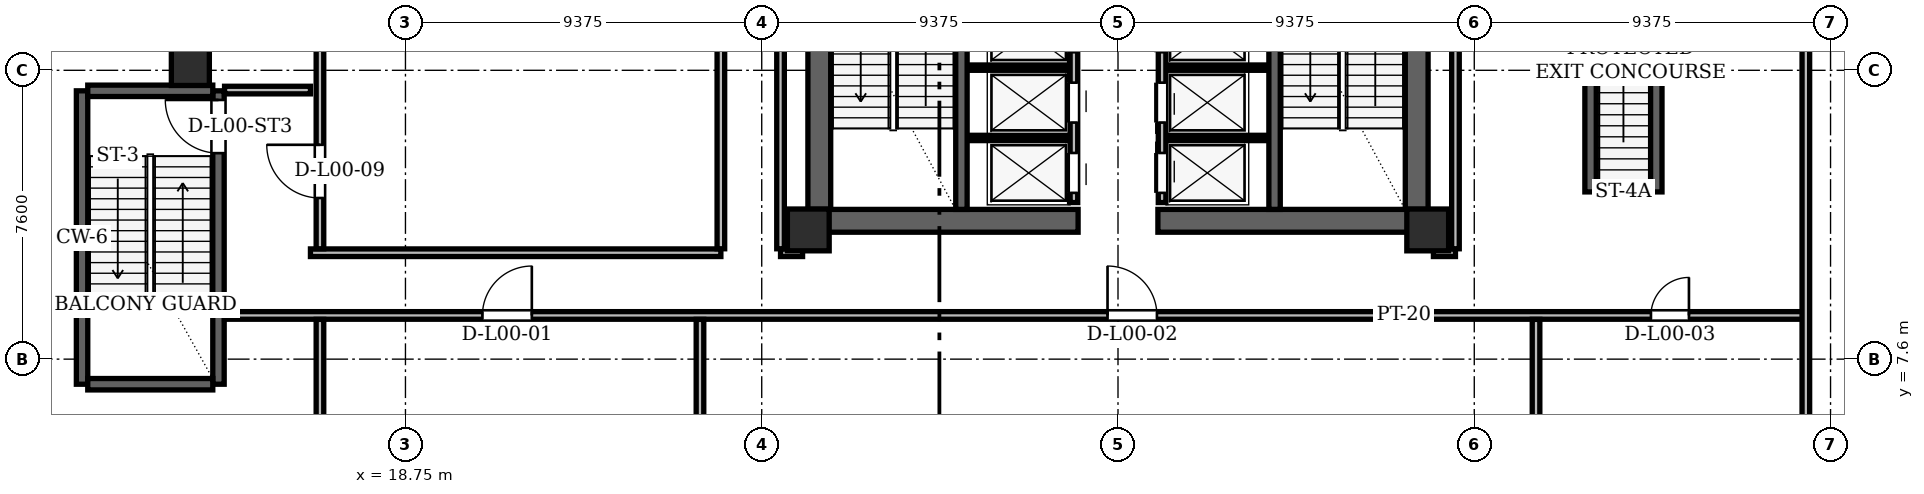
"""IFC4 building model, lengths in metres.
Left out: names, types, materials, properties, quantities, classifications, styles, units other than length and angle.
Written with IfcOpenShell. Run it as: python <this file> out.ifc"""

import sys

from ifc_helpers import new_model, si_unit, direction, frame, frame_2d, origin, origin_2d, place, context, subcontext, project, spatial, rectangle, hollow_rectangle, extrude, element, fill, save


model = new_model("IFC4")
c1 = context("Model", 3, precision=1e-05, world=origin(), true_north=direction((0.0, 1.0)))
c2 = subcontext(c1, "Body", "Model", "MODEL_VIEW")
j1 = project(units=[si_unit("LENGTHUNIT", "METRE"), si_unit("PLANEANGLEUNIT", "RADIAN")], contexts=[c1])
p1 = place(None, origin())
s1 = spatial("IfcSite", under=j1, at=p1, CompositionType="ELEMENT")
p2 = place(p1, origin())
s2 = spatial("IfcBuilding", under=s1, at=p2, CompositionType="ELEMENT")
p3 = place(p2, origin())
s3 = spatial("IfcBuildingStorey", under=s2, at=p3, CompositionType="ELEMENT", Elevation=0.0)
for number, where, z_axis, x_axis in (
    (1, (29.35, 11.0, 0.0), (0.0, 0.0, 1.0), (1.0, 0.0, 0.0)),
    (2, (45.65, 11.0, 0.0), (0.0, 0.0, 1.0), (1.0, 0.0, 0.0)),
):
    element("IfcColumn", number, at=place(p3, frame(where, z_axis=z_axis, x_axis=x_axis)), inside=s3, PredefinedType="COLUMN", context=c2, shape_type="SweptSolid", body=[
        extrude(hollow_rectangle(XDim=1.1, YDim=1.1, WallThickness=0.09, at=origin_2d()), origin(), (0.0, 0.0, 1.0), 5.4),
    ])
p4 = place(p3, frame((13.09, 15.3, 0.004), z_axis=(0.0, 0.0, 1.0), x_axis=(1.0, 0.0, 0.0)))
e3 = element("IfcColumn", 3, at=p4, inside=s3, PredefinedType="COLUMN", context=c2, shape_type="SweptSolid", body=[
    extrude(hollow_rectangle(XDim=1.0, YDim=1.0, WallThickness=0.085, at=origin_2d()), origin(), (0.0, 0.0, 1.0), 5.391),
])
for number, where, z_axis, x_axis in (
    (4, (29.64, 11.0, 0.0), (0.0, 0.0, 1.0), (0.0, 1.0, 0.0)),
    (5, (45.36, 11.0, 0.0), (0.0, 0.0, 1.0), (0.0, 1.0, 0.0)),
):
    element("IfcWall", number, at=place(p3, frame(where, z_axis=z_axis, x_axis=x_axis)), inside=s3, PredefinedType="SHEAR", context=c2, shape_type="SweptSolid", body=[
        extrude(rectangle(XDim=13.3, YDim=0.6, at=frame_2d((6.65, 0.0))), origin(), (0.0, 0.0, 1.0), 5.12),
    ])
for number, where, z_axis, x_axis in (
    (6, (29.35, 11.24, 0.0), (0.0, 0.0, 1.0), (1.0, 0.0, 0.0)),
    (7, (38.55, 11.24, 0.0), (0.0, 0.0, 1.0), (1.0, 0.0, 0.0)),
):
    element("IfcWall", number, at=place(p3, frame(where, z_axis=z_axis, x_axis=x_axis)), inside=s3, PredefinedType="SHEAR", context=c2, shape_type="SweptSolid", body=[
        extrude(rectangle(XDim=7.1, YDim=0.6, at=frame_2d((3.55, 0.0))), origin(), (0.0, 0.0, 1.0), 5.12),
    ])
for number, where, z_axis, x_axis in (
    (8, (33.38, 11.54, 0.0), (0.0, 0.0, 1.0), (0.0, 1.0, 0.0)),
    (9, (41.62, 11.54, 0.0), (0.0, 0.0, 1.0), (0.0, 1.0, 0.0)),
):
    element("IfcWall", number, at=place(p3, frame(where, z_axis=z_axis, x_axis=x_axis)), inside=s3, PredefinedType="SHEAR", context=c2, shape_type="SweptSolid", body=[
        extrude(rectangle(XDim=7.62, YDim=0.3, at=frame_2d((3.81, 0.0))), origin(), (0.0, 0.0, 1.0), 5.12),
    ])
p5 = place(p3, frame((10.24, 6.94, 0.0), z_axis=(0.0, 0.0, 1.0), x_axis=(0.0, 1.0, 0.0)))
e10 = element("IfcWall", 10, at=p5, inside=s3, PredefinedType="SHEAR", context=c2, shape_type="SweptSolid", body=[
    extrude(rectangle(XDim=7.72, YDim=0.3, at=frame_2d((3.86, 0.0))), origin(), (0.0, 0.0, 1.0), 5.12),
])
p6 = place(p3, frame((13.83, 6.94, 0.0), z_axis=(0.0, 0.0, 1.0), x_axis=(0.0, 1.0, 0.0)))
e11 = element("IfcWall", 11, at=p6, inside=s3, PredefinedType="SHEAR", context=c2, shape_type="SweptSolid", body=[
    extrude(rectangle(XDim=7.72, YDim=0.3, at=frame_2d((3.86, 0.0))), origin(), (0.0, 0.0, 1.0), 5.12),
])
p7 = place(p6, frame((6.08, 0.0, 0.0)))
e12 = element("IfcOpeningElement", 12, at=p7, cuts=e11, PredefinedType="OPENING", context=c2, shape_type="SweptSolid", body=[
    extrude(rectangle(XDim=1.4, YDim=2.2, at=frame_2d((0.7, 1.1))), frame((0.0, 0.15, 0.0), z_axis=(0.0, -1.0, 0.0), x_axis=(1.0, 0.0, 0.0)), (0.0, 0.0, 1.0), 0.3),
])
for number, where, z_axis, x_axis in (
    (13, (10.39, 6.94, 0.0), (0.0, 0.0, 1.0), (1.0, 0.0, 0.0)),
    (14, (10.39, 14.66, 0.0), (0.0, 0.0, 1.0), (1.0, 0.0, 0.0)),
):
    element("IfcWall", number, at=place(p3, frame(where, z_axis=z_axis, x_axis=x_axis)), inside=s3, PredefinedType="SHEAR", context=c2, shape_type="SweptSolid", body=[
        extrude(rectangle(XDim=3.29, YDim=0.3, at=frame_2d((1.645, 0.0))), origin(), (0.0, 0.0, 1.0), 5.12),
    ])
for number, where, z_axis, x_axis in (
    (15, (49.935, 12.0, 0.0), (0.0, 0.0, 1.0), (0.0, 1.0, 0.0)),
    (16, (51.665, 12.0, 0.0), (0.0, 0.0, 1.0), (0.0, 1.0, 0.0)),
):
    element("IfcWall", number, at=place(p3, frame(where, z_axis=z_axis, x_axis=x_axis)), inside=s3, PredefinedType="SHEAR", context=c2, shape_type="SweptSolid", body=[
        extrude(rectangle(XDim=8.7, YDim=0.3, at=frame_2d((4.35, 0.0))), origin(), (0.0, 0.0, 1.0), 5.12),
    ])
p8 = place(p3, frame((36.34, 11.72, 0.0), z_axis=(0.0, 0.0, 1.0), x_axis=(0.0, 1.0, 0.0)))
e17 = element("IfcWall", 17, at=p8, inside=s3, PredefinedType="PARTITIONING", context=c2, shape_type="SweptSolid", body=[
    extrude(rectangle(XDim=7.6, YDim=0.2, at=frame_2d((3.8, 0.0))), origin(), (0.0, 0.0, 1.0), 5.12),
])
p9 = place(p8, frame((0.255, 0.0, 0.0)))
e18 = element("IfcOpeningElement", 18, at=p9, cuts=e17, PredefinedType="OPENING", context=c2, shape_type="SweptSolid", body=[
    extrude(rectangle(XDim=1.05, YDim=2.15, at=frame_2d((0.525, 1.075))), frame((0.0, 0.1, 0.0), z_axis=(0.0, -1.0, 0.0), x_axis=(1.0, 0.0, 0.0)), (0.0, 0.0, 1.0), 0.2),
])
p10 = place(p8, frame((2.105, 0.0, 0.0)))
e19 = element("IfcOpeningElement", 19, at=p10, cuts=e17, PredefinedType="OPENING", context=c2, shape_type="SweptSolid", body=[
    extrude(rectangle(XDim=1.05, YDim=2.15, at=frame_2d((0.525, 1.075))), frame((0.0, 0.1, 0.0), z_axis=(0.0, -1.0, 0.0), x_axis=(1.0, 0.0, 0.0)), (0.0, 0.0, 1.0), 0.2),
])
p11 = place(p8, frame((3.955, 0.0, 0.0)))
e20 = element("IfcOpeningElement", 20, at=p11, cuts=e17, PredefinedType="OPENING", context=c2, shape_type="SweptSolid", body=[
    extrude(rectangle(XDim=1.05, YDim=2.15, at=frame_2d((0.525, 1.075))), frame((0.0, 0.1, 0.0), z_axis=(0.0, -1.0, 0.0), x_axis=(1.0, 0.0, 0.0)), (0.0, 0.0, 1.0), 0.2),
])
p12 = place(p8, frame((6.005, 0.0, 0.0)))
e21 = element("IfcOpeningElement", 21, at=p12, cuts=e17, PredefinedType="OPENING", context=c2, shape_type="SweptSolid", body=[
    extrude(rectangle(XDim=1.05, YDim=2.15, at=frame_2d((0.525, 1.075))), frame((0.0, 0.1, 0.0), z_axis=(0.0, -1.0, 0.0), x_axis=(1.0, 0.0, 0.0)), (0.0, 0.0, 1.0), 0.2),
])
for number, where, z_axis, x_axis in (
    (22, (33.56, 13.42, 0.0), (0.0, 0.0, 1.0), (1.0, 0.0, 0.0)),
    (23, (33.56, 15.27, 0.0), (0.0, 0.0, 1.0), (1.0, 0.0, 0.0)),
):
    element("IfcWall", number, at=place(p3, frame(where, z_axis=z_axis, x_axis=x_axis)), inside=s3, PredefinedType="PARTITIONING", context=c2, shape_type="SweptSolid", body=[
        extrude(rectangle(XDim=2.66, YDim=0.14, at=frame_2d((1.33, 0.0))), origin(), (0.0, 0.0, 1.0), 5.12),
    ])
p13 = place(p3, frame((38.66, 11.72, 0.0), z_axis=(0.0, 0.0, 1.0), x_axis=(0.0, 1.0, 0.0)))
e24 = element("IfcWall", 24, at=p13, inside=s3, PredefinedType="PARTITIONING", context=c2, shape_type="SweptSolid", body=[
    extrude(rectangle(XDim=9.1, YDim=0.2, at=frame_2d((4.55, 0.0))), origin(), (0.0, 0.0, 1.0), 5.12),
])
p14 = place(p13, frame((0.255, 0.0, 0.0)))
e25 = element("IfcOpeningElement", 25, at=p14, cuts=e24, PredefinedType="OPENING", context=c2, shape_type="SweptSolid", body=[
    extrude(rectangle(XDim=1.05, YDim=2.15, at=frame_2d((0.525, 1.075))), frame((0.0, 0.1, 0.0), z_axis=(0.0, -1.0, 0.0), x_axis=(1.0, 0.0, 0.0)), (0.0, 0.0, 1.0), 0.2),
])
p15 = place(p13, frame((2.105, 0.0, 0.0)))
e26 = element("IfcOpeningElement", 26, at=p15, cuts=e24, PredefinedType="OPENING", context=c2, shape_type="SweptSolid", body=[
    extrude(rectangle(XDim=1.05, YDim=2.15, at=frame_2d((0.525, 1.075))), frame((0.0, 0.1, 0.0), z_axis=(0.0, -1.0, 0.0), x_axis=(1.0, 0.0, 0.0)), (0.0, 0.0, 1.0), 0.2),
])
p16 = place(p13, frame((3.955, 0.0, 0.0)))
e27 = element("IfcOpeningElement", 27, at=p16, cuts=e24, PredefinedType="OPENING", context=c2, shape_type="SweptSolid", body=[
    extrude(rectangle(XDim=1.05, YDim=2.15, at=frame_2d((0.525, 1.075))), frame((0.0, 0.1, 0.0), z_axis=(0.0, -1.0, 0.0), x_axis=(1.0, 0.0, 0.0)), (0.0, 0.0, 1.0), 0.2),
])
p17 = place(p13, frame((5.905, 0.0, 0.0)))
e28 = element("IfcOpeningElement", 28, at=p17, cuts=e24, PredefinedType="OPENING", context=c2, shape_type="SweptSolid", body=[
    extrude(rectangle(XDim=1.05, YDim=2.15, at=frame_2d((0.525, 1.075))), frame((0.0, 0.1, 0.0), z_axis=(0.0, -1.0, 0.0), x_axis=(1.0, 0.0, 0.0)), (0.0, 0.0, 1.0), 0.2),
])
p18 = place(p13, frame((7.705, 0.0, 0.0)))
e29 = element("IfcOpeningElement", 29, at=p18, cuts=e24, PredefinedType="OPENING", context=c2, shape_type="SweptSolid", body=[
    extrude(rectangle(XDim=1.05, YDim=2.15, at=frame_2d((0.525, 1.075))), frame((0.0, 0.1, 0.0), z_axis=(0.0, -1.0, 0.0), x_axis=(1.0, 0.0, 0.0)), (0.0, 0.0, 1.0), 0.2),
])
for number, where, z_axis, x_axis in (
    (30, (38.78, 13.42, 0.0), (0.0, 0.0, 1.0), (1.0, 0.0, 0.0)),
    (31, (38.78, 15.27, 0.0), (0.0, 0.0, 1.0), (1.0, 0.0, 0.0)),
):
    element("IfcWall", number, at=place(p3, frame(where, z_axis=z_axis, x_axis=x_axis)), inside=s3, PredefinedType="PARTITIONING", context=c2, shape_type="SweptSolid", body=[
        extrude(rectangle(XDim=2.66, YDim=0.14, at=frame_2d((1.33, 0.0))), origin(), (0.0, 0.0, 1.0), 5.12),
    ])
p19 = place(p3, frame((13.99, 8.75, 0.0), z_axis=(0.0, 0.0, 1.0), x_axis=(1.0, 0.0, 0.0)))
e32 = element("IfcWall", 32, at=p19, inside=s3, PredefinedType="PARTITIONING", context=c2, shape_type="SweptSolid", body=[
    extrude(rectangle(XDim=41.61, YDim=0.2, at=frame_2d((20.805, 0.0))), origin(), (0.0, 0.0, 1.0), 4.183),
])
p20 = place(p19, frame((6.785, 0.0, 0.0)))
e33 = element("IfcOpeningElement", 33, at=p20, cuts=e32, PredefinedType="OPENING", context=c2, shape_type="SweptSolid", body=[
    extrude(rectangle(XDim=1.3, YDim=2.2, at=frame_2d((0.65, 1.1))), frame((0.0, 0.1, 0.0), z_axis=(0.0, -1.0, 0.0), x_axis=(1.0, 0.0, 0.0)), (0.0, 0.0, 1.0), 0.2),
])
p21 = place(p19, frame((23.235, 0.0, 0.0)))
e34 = element("IfcOpeningElement", 34, at=p21, cuts=e32, PredefinedType="OPENING", context=c2, shape_type="SweptSolid", body=[
    extrude(rectangle(XDim=1.3, YDim=2.2, at=frame_2d((0.65, 1.1))), frame((0.0, 0.1, 0.0), z_axis=(0.0, -1.0, 0.0), x_axis=(1.0, 0.0, 0.0)), (0.0, 0.0, 1.0), 0.2),
])
p22 = place(p19, frame((37.534, 0.0, 0.0)))
e35 = element("IfcOpeningElement", 35, at=p22, cuts=e32, PredefinedType="OPENING", context=c2, shape_type="SweptSolid", body=[
    extrude(rectangle(XDim=1.0, YDim=2.18, at=frame_2d((0.5, 1.09))), frame((0.0, 0.1, 0.0), z_axis=(0.0, -1.0, 0.0), x_axis=(1.0, 0.0, 0.0)), (0.0, 0.0, 1.0), 0.2),
])
p23 = place(p3, frame((16.25, 10.4, 0.0), z_axis=(0.0, 0.0, 1.0), x_axis=(1.0, 0.0, 0.0)))
e36 = element("IfcWall", 36, at=p23, inside=s3, PredefinedType="PARTITIONING", context=c2, shape_type="SweptSolid", body=[
    extrude(rectangle(XDim=10.8, YDim=0.2, at=frame_2d((5.4, 0.0))), origin(), (0.0, 0.0, 1.0), 5.12),
])
for number, where, z_axis, x_axis in (
    (37, (28.62, 10.4, 0.0), (0.0, 0.0, 1.0), (1.0, 0.0, 0.0)),
    (38, (45.8, 10.4, 0.0), (0.0, 0.0, 1.0), (1.0, 0.0, 0.0)),
):
    element("IfcWall", number, at=place(p3, frame(where, z_axis=z_axis, x_axis=x_axis)), inside=s3, PredefinedType="PARTITIONING", context=c2, shape_type="SweptSolid", body=[
        extrude(rectangle(XDim=0.58, YDim=0.2, at=frame_2d((0.29, 0.0))), origin(), (0.0, 0.0, 1.0), 4.183),
    ])
p24 = place(p3, frame((13.99, 14.68, 0.0), z_axis=(0.0, 0.0, 1.0), x_axis=(1.0, 0.0, 0.0)))
e39 = element("IfcWall", 39, at=p24, inside=s3, PredefinedType="PARTITIONING", context=c2, shape_type="SweptSolid", body=[
    extrude(rectangle(XDim=2.26, YDim=0.2, at=frame_2d((1.13, 0.0))), origin(), (0.0, 0.0, 1.0), 4.183),
])
p25 = place(p3, frame((16.5, 1.644, 0.0), z_axis=(0.0, 0.0, 1.0), x_axis=(0.0, 1.0, 0.0)))
e40 = element("IfcWall", 40, at=p25, inside=s3, PredefinedType="PARTITIONING", context=c2, shape_type="SweptSolid", body=[
    extrude(rectangle(XDim=7.002, YDim=0.2, at=frame_2d((3.501, 0.0))), origin(), (0.0, 0.0, 1.0), 5.12),
])
p26 = place(p3, frame((16.5, 10.504, 0.0), z_axis=(0.0, 0.0, 1.0), x_axis=(0.0, 1.0, 0.0)))
e41 = element("IfcWall", 41, at=p26, inside=s3, PredefinedType="PARTITIONING", context=c2, shape_type="SweptSolid", body=[
    extrude(rectangle(XDim=15.892, YDim=0.2, at=frame_2d((7.946, 0.0))), origin(), (0.0, 0.0, 1.0), 4.183),
])
p27 = place(p26, frame((1.336, 0.0, 0.0)))
e42 = element("IfcOpeningElement", 42, at=p27, cuts=e41, PredefinedType="OPENING", context=c2, shape_type="SweptSolid", body=[
    extrude(rectangle(XDim=1.4, YDim=2.2, at=frame_2d((0.7, 1.1))), frame((0.0, 0.1, 0.0), z_axis=(0.0, -1.0, 0.0), x_axis=(1.0, 0.0, 0.0)), (0.0, 0.0, 1.0), 0.2),
])
p28 = place(p3, frame((26.5, 1.644, 0.0), z_axis=(0.0, 0.0, 1.0), x_axis=(0.0, 1.0, 0.0)))
e43 = element("IfcWall", 43, at=p28, inside=s3, PredefinedType="PARTITIONING", context=c2, shape_type="SweptSolid", body=[
    extrude(rectangle(XDim=7.002, YDim=0.2, at=frame_2d((3.501, 0.0))), origin(), (0.0, 0.0, 1.0), 4.183),
])
p29 = place(p3, frame((27.05, 10.504, 0.0), z_axis=(0.0, 0.0, 1.0), x_axis=(0.0, 1.0, 0.0)))
e44 = element("IfcWall", 44, at=p29, inside=s3, PredefinedType="PARTITIONING", context=c2, shape_type="SweptSolid", body=[
    extrude(rectangle(XDim=13.492, YDim=0.2, at=frame_2d((6.746, 0.0))), origin(), (0.0, 0.0, 1.0), 4.183),
])
p30 = place(p3, frame((28.62, 10.504, 0.0), z_axis=(0.0, 0.0, 1.0), x_axis=(0.0, 1.0, 0.0)))
e45 = element("IfcWall", 45, at=p30, inside=s3, PredefinedType="PARTITIONING", context=c2, shape_type="SweptSolid", body=[
    extrude(rectangle(XDim=13.596, YDim=0.2, at=frame_2d((6.798, 0.0))), origin(), (0.0, 0.0, 1.0), 4.183),
])
p31 = place(p3, frame((46.38, 10.504, 0.0), z_axis=(0.0, 0.0, 1.0), x_axis=(0.0, 1.0, 0.0)))
e46 = element("IfcWall", 46, at=p31, inside=s3, PredefinedType="PARTITIONING", context=c2, shape_type="SweptSolid", body=[
    extrude(rectangle(XDim=13.596, YDim=0.2, at=frame_2d((6.798, 0.0))), origin(), (0.0, 0.0, 1.0), 5.12),
])
p32 = place(p3, frame((48.5, 1.644, 0.0), z_axis=(0.0, 0.0, 1.0), x_axis=(0.0, 1.0, 0.0)))
e47 = element("IfcWall", 47, at=p32, inside=s3, PredefinedType="PARTITIONING", context=c2, shape_type="SweptSolid", body=[
    extrude(rectangle(XDim=7.002, YDim=0.2, at=frame_2d((3.501, 0.0))), origin(), (0.0, 0.0, 1.0), 4.183),
])
p33 = place(p3, frame((55.6, 1.644, 0.0), z_axis=(0.0, 0.0, 1.0), x_axis=(0.0, 1.0, 0.0)))
e48 = element("IfcWall", 48, at=p33, inside=s3, PredefinedType="PARTITIONING", context=c2, shape_type="SweptSolid", body=[
    extrude(rectangle(XDim=19.352, YDim=0.2, at=frame_2d((9.676, 0.0))), origin(), (0.0, 0.0, 1.0), 4.254),
])
p34 = place(p9, origin())
e49 = element("IfcDoor", 49, at=p34, inside=s3, OperationType="SLIDING_TO_LEFT", PredefinedType="DOOR", context=c2, shape_type="SweptSolid", body=[
    extrude(rectangle(XDim=1.05, YDim=2.15, at=frame_2d((0.525, 1.075))), frame((0.0, 0.025, 0.0), z_axis=(0.0, -1.0, 0.0), x_axis=(1.0, 0.0, 0.0)), (0.0, 0.0, 1.0), 0.05),
])
fill(e18, e49)
p35 = place(p10, origin())
e50 = element("IfcDoor", 50, at=p35, inside=s3, OperationType="SLIDING_TO_RIGHT", PredefinedType="DOOR", context=c2, shape_type="SweptSolid", body=[
    extrude(rectangle(XDim=1.05, YDim=2.15, at=frame_2d((0.525, 1.075))), frame((0.0, 0.025, 0.0), z_axis=(0.0, -1.0, 0.0), x_axis=(1.0, 0.0, 0.0)), (0.0, 0.0, 1.0), 0.05),
])
fill(e19, e50)
p36 = place(p11, origin())
e51 = element("IfcDoor", 51, at=p36, inside=s3, OperationType="SLIDING_TO_LEFT", PredefinedType="DOOR", context=c2, shape_type="SweptSolid", body=[
    extrude(rectangle(XDim=1.05, YDim=2.15, at=frame_2d((0.525, 1.075))), frame((0.0, 0.025, 0.0), z_axis=(0.0, -1.0, 0.0), x_axis=(1.0, 0.0, 0.0)), (0.0, 0.0, 1.0), 0.05),
])
fill(e20, e51)
p37 = place(p14, origin())
e52 = element("IfcDoor", 52, at=p37, inside=s3, OperationType="SLIDING_TO_RIGHT", PredefinedType="DOOR", context=c2, shape_type="SweptSolid", body=[
    extrude(rectangle(XDim=1.05, YDim=2.15, at=frame_2d((0.525, 1.075))), frame((0.0, 0.025, 0.0), z_axis=(0.0, -1.0, 0.0), x_axis=(1.0, 0.0, 0.0)), (0.0, 0.0, 1.0), 0.05),
])
fill(e25, e52)
p38 = place(p15, origin())
e53 = element("IfcDoor", 53, at=p38, inside=s3, OperationType="SLIDING_TO_LEFT", PredefinedType="DOOR", context=c2, shape_type="SweptSolid", body=[
    extrude(rectangle(XDim=1.05, YDim=2.15, at=frame_2d((0.525, 1.075))), frame((0.0, 0.025, 0.0), z_axis=(0.0, -1.0, 0.0), x_axis=(1.0, 0.0, 0.0)), (0.0, 0.0, 1.0), 0.05),
])
fill(e26, e53)
p39 = place(p16, origin())
e54 = element("IfcDoor", 54, at=p39, inside=s3, OperationType="SLIDING_TO_RIGHT", PredefinedType="DOOR", context=c2, shape_type="SweptSolid", body=[
    extrude(rectangle(XDim=1.05, YDim=2.15, at=frame_2d((0.525, 1.075))), frame((0.0, 0.025, 0.0), z_axis=(0.0, -1.0, 0.0), x_axis=(1.0, 0.0, 0.0)), (0.0, 0.0, 1.0), 0.05),
])
fill(e27, e54)
p40 = place(p7, origin())
e55 = element("IfcDoor", 55, at=p40, inside=s3, OperationType="SINGLE_SWING_RIGHT", PredefinedType="DOOR", context=c2, shape_type="SweptSolid", body=[
    extrude(rectangle(XDim=1.4, YDim=2.2, at=frame_2d((0.7, 1.1))), frame((0.0, 0.025, 0.0), z_axis=(0.0, -1.0, 0.0), x_axis=(1.0, 0.0, 0.0)), (0.0, 0.0, 1.0), 0.05),
])
fill(e12, e55)
p41 = place(p20, origin())
e56 = element("IfcDoor", 56, at=p41, inside=s3, OperationType="SINGLE_SWING_RIGHT", PredefinedType="DOOR", context=c2, shape_type="SweptSolid", body=[
    extrude(rectangle(XDim=1.3, YDim=2.2, at=frame_2d((0.65, 1.1))), frame((0.0, 0.025, 0.0), z_axis=(0.0, -1.0, 0.0), x_axis=(1.0, 0.0, 0.0)), (0.0, 0.0, 1.0), 0.05),
])
fill(e33, e56)
p42 = place(p21, origin())
e57 = element("IfcDoor", 57, at=p42, inside=s3, OperationType="SINGLE_SWING_LEFT", PredefinedType="DOOR", context=c2, shape_type="SweptSolid", body=[
    extrude(rectangle(XDim=1.3, YDim=2.2, at=frame_2d((0.65, 1.1))), frame((0.0, 0.025, 0.0), z_axis=(0.0, -1.0, 0.0), x_axis=(1.0, 0.0, 0.0)), (0.0, 0.0, 1.0), 0.05),
])
fill(e34, e57)
p43 = place(p22, origin())
e58 = element("IfcDoor", 58, at=p43, inside=s3, OperationType="SINGLE_SWING_RIGHT", PredefinedType="DOOR", context=c2, shape_type="SweptSolid", body=[
    extrude(rectangle(XDim=1.0, YDim=2.18, at=frame_2d((0.5, 1.09))), frame((0.0, 0.025, 0.0), z_axis=(0.0, -1.0, 0.0), x_axis=(1.0, 0.0, 0.0)), (0.0, 0.0, 1.0), 0.05),
])
fill(e35, e58)
p44 = place(p27, origin())
e59 = element("IfcDoor", 59, at=p44, inside=s3, OperationType="SINGLE_SWING_RIGHT", PredefinedType="DOOR", context=c2, shape_type="SweptSolid", body=[
    extrude(rectangle(XDim=1.4, YDim=2.2, at=frame_2d((0.7, 1.1))), frame((0.0, 0.025, 0.0), z_axis=(0.0, -1.0, 0.0), x_axis=(1.0, 0.0, 0.0)), (0.0, 0.0, 1.0), 0.05),
])
fill(e42, e59)
save(model, sys.argv[1])
